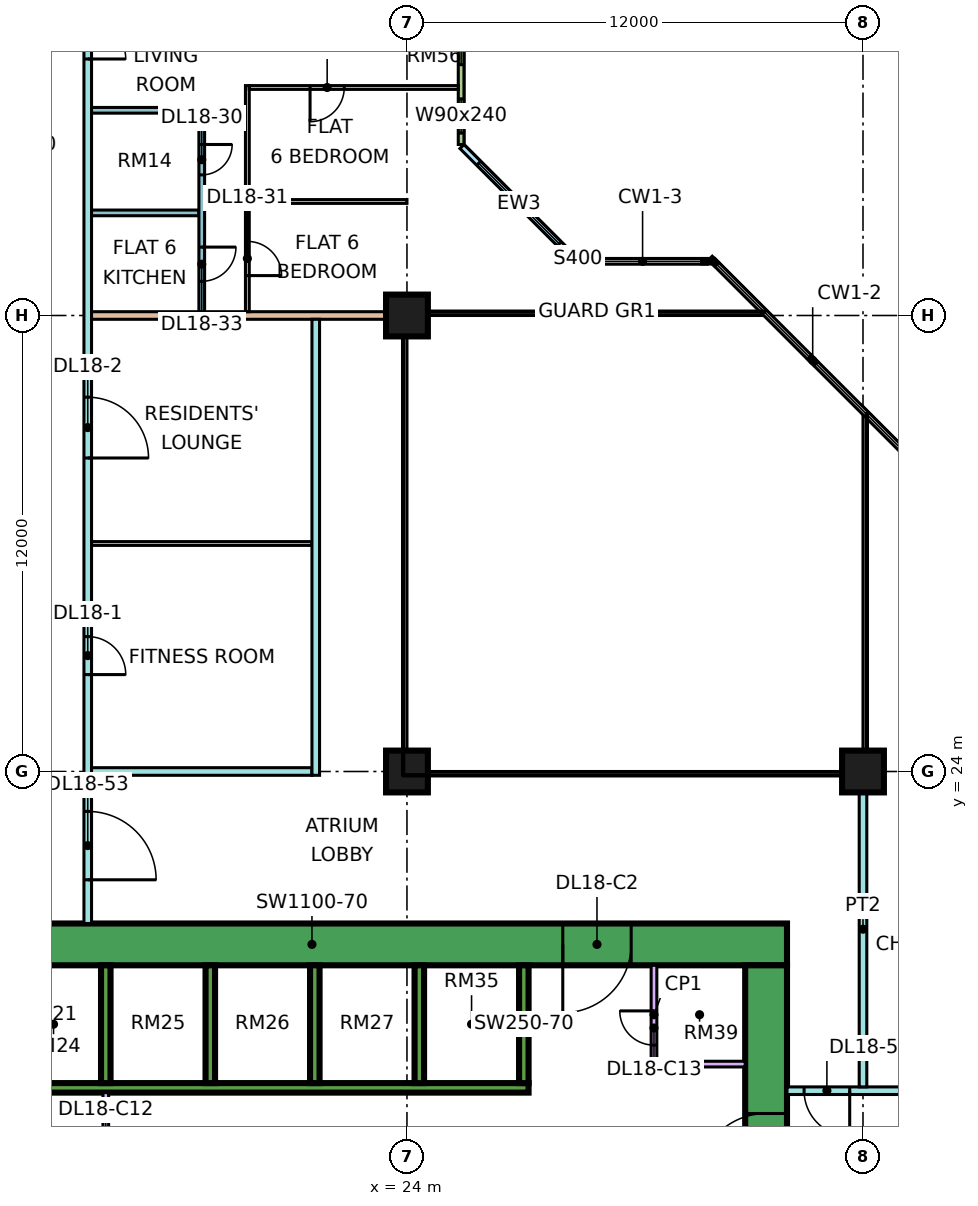
"""IFC4 building model, lengths in metres.
Left out: names, types, materials, properties, quantities, classifications, styles, units other than length and angle.
Written with IfcOpenShell. Run it as: python <this file> out.ifc"""

import sys

from ifc_helpers import new_model, si_unit, direction, frame, frame_2d, origin, origin_2d, place, context, subcontext, project, spatial, rectangle, extrude, element, fill, save


model = new_model("IFC4")
c1 = context("Model", 3, precision=1e-05, world=origin(), true_north=direction((0.0, 1.0)))
c2 = subcontext(c1, "Body", "Model", "MODEL_VIEW")
j1 = project(units=[si_unit("LENGTHUNIT", "METRE"), si_unit("PLANEANGLEUNIT", "RADIAN")], contexts=[c1])
p1 = place(None, origin())
s1 = spatial("IfcSite", under=j1, at=p1, CompositionType="ELEMENT")
p2 = place(p1, origin())
s2 = spatial("IfcBuilding", under=s1, at=p2, CompositionType="ELEMENT")
p3 = place(p2, frame((0.0, 0.0, 82.65)))
s3 = spatial("IfcBuildingStorey", under=s2, at=p3, CompositionType="ELEMENT", Elevation=82.65)
for number, where, z_axis, x_axis in (
    (1, (24.0, 24.0, 0.0), (0.0, 0.0, 1.0), (1.0, 0.0, 0.0)),
    (2, (24.0, 36.0, 0.0), (0.0, 0.0, 1.0), (1.0, 0.0, 0.0)),
    (3, (36.0, 24.0, 0.0), (0.0, 0.0, 1.0), (1.0, 0.0, 0.0)),
):
    element("IfcColumn", number, at=place(p3, frame(where, z_axis=z_axis, x_axis=x_axis)), inside=s3, PredefinedType="COLUMN", context=c2, shape_type="SweptSolid", body=[
        extrude(rectangle(XDim=1.1, YDim=1.1, at=origin_2d()), origin(), (0.0, 0.0, 1.0), 3.75),
    ])
p4 = place(p3, frame((9.0, 19.45, 0.0), z_axis=(0.0, 0.0, 1.0), x_axis=(1.0, 0.0, 0.0)))
e4 = element("IfcWall", 4, at=p4, inside=s3, PredefinedType="SHEAR", context=c2, shape_type="SweptSolid", body=[
    extrude(rectangle(XDim=25.0, YDim=1.1, at=frame_2d((12.5, 0.0))), origin(), (0.0, 0.0, 1.0), 3.75),
])
p5 = place(p4, frame((19.1, 0.0, 0.0)))
e5 = element("IfcOpeningElement", 5, at=p5, cuts=e4, PredefinedType="OPENING", context=c2, shape_type="SweptSolid", body=[
    extrude(rectangle(XDim=1.8, YDim=2.4, at=frame_2d((0.9, 1.2))), frame((0.0, 0.56, 0.0), z_axis=(0.0, -1.0, 0.0), x_axis=(1.0, 0.0, 0.0)), (0.0, 0.0, 1.0), 1.12),
])
p6 = place(p3, frame((33.45, 8.1, 0.0), z_axis=(0.0, 0.0, 1.0), x_axis=(0.0, 1.0, 0.0)))
e6 = element("IfcWall", 6, at=p6, inside=s3, PredefinedType="SHEAR", context=c2, shape_type="SweptSolid", body=[
    extrude(rectangle(XDim=10.8, YDim=1.1, at=frame_2d((5.4, 0.0))), origin(), (0.0, 0.0, 1.0), 3.75),
])
p7 = place(p6, frame((5.1, 0.0, 0.0)))
e7 = element("IfcOpeningElement", 7, at=p7, cuts=e6, PredefinedType="OPENING", context=c2, shape_type="SweptSolid", body=[
    extrude(rectangle(XDim=1.8, YDim=2.4, at=frame_2d((0.9, 1.2))), frame((0.0, 0.56, 0.0), z_axis=(0.0, -1.0, 0.0), x_axis=(1.0, 0.0, 0.0)), (0.0, 0.0, 1.0), 1.12),
])
p8 = place(p3, frame((13.45, 15.675, 0.0), z_axis=(0.0, 0.0, 1.0), x_axis=(1.0, 0.0, 0.0)))
e8 = element("IfcWall", 8, at=p8, inside=s3, PredefinedType="SHEAR", context=c2, shape_type="SweptSolid", body=[
    extrude(rectangle(XDim=13.75, YDim=0.25, at=frame_2d((6.875, 0.0))), origin(), (0.0, 0.0, 1.0), 3.75),
])
for number, where, z_axis, x_axis in (
    (9, (16.075, 15.8, 0.0), (0.0, 0.0, 1.0), (0.0, 1.0, 0.0)),
    (10, (18.825, 15.8, 0.0), (0.0, 0.0, 1.0), (0.0, 1.0, 0.0)),
    (11, (21.575, 15.8, 0.0), (0.0, 0.0, 1.0), (0.0, 1.0, 0.0)),
    (12, (24.325, 15.8, 0.0), (0.0, 0.0, 1.0), (0.0, 1.0, 0.0)),
    (13, (27.075, 15.8, 0.0), (0.0, 0.0, 1.0), (0.0, 1.0, 0.0)),
):
    element("IfcWall", number, at=place(p3, frame(where, z_axis=z_axis, x_axis=x_axis)), inside=s3, PredefinedType="SHEAR", context=c2, shape_type="SweptSolid", body=[
        extrude(rectangle(XDim=3.1, YDim=0.25, at=frame_2d((1.55, 0.0))), origin(), (0.0, 0.0, 1.0), 3.75),
    ])
p9 = place(p3, frame((28.447, 37.447, 0.0), z_axis=(0.0, 0.0, 1.0), x_axis=(-0.707106781187, 0.707106781187, 0.0)))
e14 = element("IfcWall", 14, at=p9, inside=s3, PredefinedType="SOLIDWALL", context=c2, shape_type="SweptSolid", body=[
    extrude(rectangle(XDim=4.243, YDim=0.15, at=frame_2d((2.121, 0.0))), origin(), (0.0, 0.0, 1.0), 3.3),
])
p10 = place(p9, frame((0.621, 0.0, 0.45)))
e15 = element("IfcOpeningElement", 15, at=p10, cuts=e14, PredefinedType="OPENING", context=c2, shape_type="SweptSolid", body=[
    extrude(rectangle(XDim=3.0, YDim=2.4, at=frame_2d((1.5, 1.2))), frame((0.0, 0.085, 0.0), z_axis=(0.0, -1.0, 0.0), x_axis=(1.0, 0.0, 0.0)), (0.0, 0.0, 1.0), 0.17),
])
p11 = place(p3, frame((25.425, 40.5, 0.0), z_axis=(0.0, 0.0, 1.0), x_axis=(0.0, 1.0, 0.0)))
e16 = element("IfcWall", 16, at=p11, inside=s3, PredefinedType="SOLIDWALL", context=c2, shape_type="SweptSolid", body=[
    extrude(rectangle(XDim=7.425, YDim=0.15, at=frame_2d((3.712, 0.0))), origin(), (0.0, 0.0, 1.0), 3.3),
])
p12 = place(p11, frame((0.3, 0.0, 0.45)))
e17 = element("IfcOpeningElement", 17, at=p12, cuts=e16, PredefinedType="OPENING", context=c2, shape_type="SweptSolid", body=[
    extrude(rectangle(XDim=0.9, YDim=2.4, at=frame_2d((0.45, 1.2))), frame((0.0, 0.085, 0.0), z_axis=(0.0, -1.0, 0.0), x_axis=(1.0, 0.0, 0.0)), (0.0, 0.0, 1.0), 0.17),
])
p13 = place(p11, frame((2.1, 0.0, 0.45)))
e18 = element("IfcOpeningElement", 18, at=p13, cuts=e16, PredefinedType="OPENING", context=c2, shape_type="SweptSolid", body=[
    extrude(rectangle(XDim=1.8, YDim=2.4, at=frame_2d((0.9, 1.2))), frame((0.0, 0.085, 0.0), z_axis=(0.0, -1.0, 0.0), x_axis=(1.0, 0.0, 0.0)), (0.0, 0.0, 1.0), 0.17),
])
p14 = place(p11, frame((5.062, 0.0, 0.45)))
e19 = element("IfcOpeningElement", 19, at=p14, cuts=e16, PredefinedType="OPENING", context=c2, shape_type="SweptSolid", body=[
    extrude(rectangle(XDim=1.8, YDim=2.4, at=frame_2d((0.9, 1.2))), frame((0.0, 0.085, 0.0), z_axis=(0.0, -1.0, 0.0), x_axis=(1.0, 0.0, 0.0)), (0.0, 0.0, 1.0), 0.17),
])
p15 = place(p3, frame((16.075, 11.45, 0.0), z_axis=(0.0, 0.0, 1.0), x_axis=(0.0, 1.0, 0.0)))
e20 = element("IfcWall", 20, at=p15, inside=s3, PredefinedType="PARTITIONING", context=c2, shape_type="SweptSolid", body=[
    extrude(rectangle(XDim=4.1, YDim=0.15, at=frame_2d((2.05, 0.0))), origin(), (0.0, 0.0, 1.0), 3.3),
])
p16 = place(p15, frame((1.15, 0.0, 0.0)))
e21 = element("IfcOpeningElement", 21, at=p16, cuts=e20, PredefinedType="OPENING", context=c2, shape_type="SweptSolid", body=[
    extrude(rectangle(XDim=1.8, YDim=2.4, at=frame_2d((0.9, 1.2))), frame((0.0, 0.085, 0.0), z_axis=(0.0, -1.0, 0.0), x_axis=(1.0, 0.0, 0.0)), (0.0, 0.0, 1.0), 0.17),
])
p17 = place(p3, frame((30.5, 16.3, 0.0), z_axis=(0.0, 0.0, 1.0), x_axis=(0.0, 1.0, 0.0)))
e22 = element("IfcWall", 22, at=p17, inside=s3, PredefinedType="PARTITIONING", context=c2, shape_type="SweptSolid", body=[
    extrude(rectangle(XDim=2.6, YDim=0.15, at=frame_2d((1.3, 0.0))), origin(), (0.0, 0.0, 1.0), 3.3),
])
p18 = place(p17, frame((0.5, 0.0, 0.0)))
e23 = element("IfcOpeningElement", 23, at=p18, cuts=e22, PredefinedType="OPENING", context=c2, shape_type="SweptSolid", body=[
    extrude(rectangle(XDim=0.9, YDim=2.1, at=frame_2d((0.45, 1.05))), frame((0.0, 0.085, 0.0), z_axis=(0.0, -1.0, 0.0), x_axis=(1.0, 0.0, 0.0)), (0.0, 0.0, 1.0), 0.17),
])
p19 = place(p3, frame((30.5, 16.3, 0.0), z_axis=(0.0, 0.0, 1.0), x_axis=(1.0, 0.0, 0.0)))
e24 = element("IfcWall", 24, at=p19, inside=s3, PredefinedType="PARTITIONING", context=c2, shape_type="SweptSolid", body=[
    extrude(rectangle(XDim=2.4, YDim=0.15, at=frame_2d((1.2, 0.0))), origin(), (0.0, 0.0, 1.0), 3.3),
])
p20 = place(p3, frame((15.6, 20.0, 0.0), z_axis=(0.0, 0.0, 1.0), x_axis=(0.0, 1.0, 0.0)))
e25 = element("IfcWall", 25, at=p20, inside=s3, PredefinedType="PARTITIONING", context=c2, shape_type="SweptSolid", body=[
    extrude(rectangle(XDim=27.775, YDim=0.2, at=frame_2d((13.887, 0.0))), origin(), (0.0, 0.0, 1.0), 3.3),
])
p21 = place(p20, frame((6.55, 0.0, 0.0)))
e26 = element("IfcOpeningElement", 26, at=p21, cuts=e25, PredefinedType="OPENING", context=c2, shape_type="SweptSolid", body=[
    extrude(rectangle(XDim=1.0, YDim=2.1, at=frame_2d((0.5, 1.05))), frame((0.0, 0.11, 0.0), z_axis=(0.0, -1.0, 0.0), x_axis=(1.0, 0.0, 0.0)), (0.0, 0.0, 1.0), 0.22),
])
p22 = place(p20, frame((12.25, 0.0, 0.0)))
e27 = element("IfcOpeningElement", 27, at=p22, cuts=e25, PredefinedType="OPENING", context=c2, shape_type="SweptSolid", body=[
    extrude(rectangle(XDim=1.6, YDim=2.1, at=frame_2d((0.8, 1.05))), frame((0.0, 0.11, 0.0), z_axis=(0.0, -1.0, 0.0), x_axis=(1.0, 0.0, 0.0)), (0.0, 0.0, 1.0), 0.22),
])
p23 = place(p20, frame((22.75, 0.0, 0.0)))
e28 = element("IfcOpeningElement", 28, at=p23, cuts=e25, PredefinedType="OPENING", context=c2, shape_type="SweptSolid", body=[
    extrude(rectangle(XDim=1.0, YDim=2.1, at=frame_2d((0.5, 1.05))), frame((0.0, 0.11, 0.0), z_axis=(0.0, -1.0, 0.0), x_axis=(1.0, 0.0, 0.0)), (0.0, 0.0, 1.0), 0.22),
])
p24 = place(p20, frame((1.15, 0.0, 0.0)))
e29 = element("IfcOpeningElement", 29, at=p24, cuts=e25, PredefinedType="OPENING", context=c2, shape_type="SweptSolid", body=[
    extrude(rectangle(XDim=1.8, YDim=2.1, at=frame_2d((0.9, 1.05))), frame((0.0, 0.11, 0.0), z_axis=(0.0, -1.0, 0.0), x_axis=(1.0, 0.0, 0.0)), (0.0, 0.0, 1.0), 0.22),
])
p25 = place(p20, frame((25.9, 0.0, 0.0)))
e30 = element("IfcOpeningElement", 30, at=p25, cuts=e25, PredefinedType="OPENING", context=c2, shape_type="SweptSolid", body=[
    extrude(rectangle(XDim=1.0, YDim=2.1, at=frame_2d((0.5, 1.05))), frame((0.0, 0.11, 0.0), z_axis=(0.0, -1.0, 0.0), x_axis=(1.0, 0.0, 0.0)), (0.0, 0.0, 1.0), 0.22),
])
p26 = place(p3, frame((15.7, 24.0, 0.0), z_axis=(0.0, 0.0, 1.0), x_axis=(1.0, 0.0, 0.0)))
e31 = element("IfcWall", 31, at=p26, inside=s3, PredefinedType="PARTITIONING", context=c2, shape_type="SweptSolid", body=[
    extrude(rectangle(XDim=5.8, YDim=0.2, at=frame_2d((2.9, 0.0))), origin(), (0.0, 0.0, 1.0), 3.3),
])
p27 = place(p3, frame((15.7, 30.0, 0.0), z_axis=(0.0, 0.0, 1.0), x_axis=(1.0, 0.0, 0.0)))
e32 = element("IfcWall", 32, at=p27, inside=s3, PredefinedType="PARTITIONING", context=c2, shape_type="SweptSolid", body=[
    extrude(rectangle(XDim=5.8, YDim=0.1, at=frame_2d((2.9, 0.0))), origin(), (0.0, 0.0, 1.0), 3.3),
])
p28 = place(p3, frame((15.7, 36.0, 0.0), z_axis=(0.0, 0.0, 1.0), x_axis=(1.0, 0.0, 0.0)))
e33 = element("IfcWall", 33, at=p28, inside=s3, PredefinedType="PARTITIONING", context=c2, shape_type="SweptSolid", body=[
    extrude(rectangle(XDim=8.3, YDim=0.2, at=frame_2d((4.15, 0.0))), origin(), (0.0, 0.0, 1.0), 3.3),
])
for number, where, z_axis, x_axis in (
    (34, (15.7, 38.7, 0.0), (0.0, 0.0, 1.0), (1.0, 0.0, 0.0)),
    (35, (15.7, 41.4, 0.0), (0.0, 0.0, 1.0), (1.0, 0.0, 0.0)),
):
    element("IfcWall", number, at=place(p3, frame(where, z_axis=z_axis, x_axis=x_axis)), inside=s3, PredefinedType="PARTITIONING", context=c2, shape_type="SweptSolid", body=[
        extrude(rectangle(XDim=2.825, YDim=0.15, at=frame_2d((1.413, 0.0))), origin(), (0.0, 0.0, 1.0), 3.3),
    ])
p29 = place(p3, frame((18.6, 36.1, 0.0), z_axis=(0.0, 0.0, 1.0), x_axis=(0.0, 1.0, 0.0)))
e36 = element("IfcWall", 36, at=p29, inside=s3, PredefinedType="PARTITIONING", context=c2, shape_type="SweptSolid", body=[
    extrude(rectangle(XDim=5.375, YDim=0.15, at=frame_2d((2.688, 0.0))), origin(), (0.0, 0.0, 1.0), 3.3),
])
p30 = place(p29, frame((3.6, 0.0, 0.0)))
e37 = element("IfcOpeningElement", 37, at=p30, cuts=e36, PredefinedType="OPENING", context=c2, shape_type="SweptSolid", body=[
    extrude(rectangle(XDim=0.8, YDim=2.1, at=frame_2d((0.4, 1.05))), frame((0.0, 0.085, 0.0), z_axis=(0.0, -1.0, 0.0), x_axis=(1.0, 0.0, 0.0)), (0.0, 0.0, 1.0), 0.17),
])
p31 = place(p29, frame((0.8, 0.0, 0.0)))
e38 = element("IfcOpeningElement", 38, at=p31, cuts=e36, PredefinedType="OPENING", context=c2, shape_type="SweptSolid", body=[
    extrude(rectangle(XDim=0.9, YDim=2.1, at=frame_2d((0.45, 1.05))), frame((0.0, 0.085, 0.0), z_axis=(0.0, -1.0, 0.0), x_axis=(1.0, 0.0, 0.0)), (0.0, 0.0, 1.0), 0.17),
])
p32 = place(p3, frame((19.8, 36.1, 0.0), z_axis=(0.0, 0.0, 1.0), x_axis=(0.0, 1.0, 0.0)))
e39 = element("IfcWall", 39, at=p32, inside=s3, PredefinedType="PARTITIONING", context=c2, shape_type="SweptSolid", body=[
    extrude(rectangle(XDim=5.95, YDim=0.1, at=frame_2d((2.975, 0.0))), origin(), (0.0, 0.0, 1.0), 3.3),
])
p33 = place(p32, frame((0.95, 0.0, 0.0)))
e40 = element("IfcOpeningElement", 40, at=p33, cuts=e39, PredefinedType="OPENING", context=c2, shape_type="SweptSolid", body=[
    extrude(rectangle(XDim=0.9, YDim=2.1, at=frame_2d((0.45, 1.05))), frame((0.0, 0.06, 0.0), z_axis=(0.0, -1.0, 0.0), x_axis=(1.0, 0.0, 0.0)), (0.0, 0.0, 1.0), 0.12),
])
p34 = place(p3, frame((19.85, 39.0, 0.0), z_axis=(0.0, 0.0, 1.0), x_axis=(1.0, 0.0, 0.0)))
e41 = element("IfcWall", 41, at=p34, inside=s3, PredefinedType="PARTITIONING", context=c2, shape_type="SweptSolid", body=[
    extrude(rectangle(XDim=4.15, YDim=0.1, at=frame_2d((2.075, 0.0))), origin(), (0.0, 0.0, 1.0), 3.3),
])
p35 = place(p3, frame((19.85, 42.0, 0.0), z_axis=(0.0, 0.0, 1.0), x_axis=(1.0, 0.0, 0.0)))
e42 = element("IfcWall", 42, at=p35, inside=s3, PredefinedType="PARTITIONING", context=c2, shape_type="SweptSolid", body=[
    extrude(rectangle(XDim=5.5, YDim=0.1, at=frame_2d((2.75, 0.0))), origin(), (0.0, 0.0, 1.0), 3.3),
])
p36 = place(p35, frame((1.6, 0.0, 0.0)))
e43 = element("IfcOpeningElement", 43, at=p36, cuts=e42, PredefinedType="OPENING", context=c2, shape_type="SweptSolid", body=[
    extrude(rectangle(XDim=0.9, YDim=2.1, at=frame_2d((0.45, 1.05))), frame((0.0, 0.06, 0.0), z_axis=(0.0, -1.0, 0.0), x_axis=(1.0, 0.0, 0.0)), (0.0, 0.0, 1.0), 0.12),
])
p37 = place(p3, frame((21.6, 23.9, 0.0), z_axis=(0.0, 0.0, 1.0), x_axis=(0.0, 1.0, 0.0)))
e44 = element("IfcWall", 44, at=p37, inside=s3, PredefinedType="PARTITIONING", context=c2, shape_type="SweptSolid", body=[
    extrude(rectangle(XDim=12.0, YDim=0.2, at=frame_2d((6.0, 0.0))), origin(), (0.0, 0.0, 1.0), 3.3),
])
p38 = place(p3, frame((34.0, 15.6, 0.0), z_axis=(0.0, 0.0, 1.0), x_axis=(1.0, 0.0, 0.0)))
e45 = element("IfcWall", 45, at=p38, inside=s3, PredefinedType="PARTITIONING", context=c2, shape_type="SweptSolid", body=[
    extrude(rectangle(XDim=10.35, YDim=0.2, at=frame_2d((5.175, 0.0))), origin(), (0.0, 0.0, 1.0), 3.3),
])
p39 = place(p38, frame((5.6, 0.0, 0.0)))
e46 = element("IfcOpeningElement", 46, at=p39, cuts=e45, PredefinedType="OPENING", context=c2, shape_type="SweptSolid", body=[
    extrude(rectangle(XDim=1.0, YDim=2.1, at=frame_2d((0.5, 1.05))), frame((0.0, 0.11, 0.0), z_axis=(0.0, -1.0, 0.0), x_axis=(1.0, 0.0, 0.0)), (0.0, 0.0, 1.0), 0.22),
])
p40 = place(p38, frame((0.45, 0.0, 0.0)))
e47 = element("IfcOpeningElement", 47, at=p40, cuts=e45, PredefinedType="OPENING", context=c2, shape_type="SweptSolid", body=[
    extrude(rectangle(XDim=1.2, YDim=2.1, at=frame_2d((0.6, 1.05))), frame((0.0, 0.11, 0.0), z_axis=(0.0, -1.0, 0.0), x_axis=(1.0, 0.0, 0.0)), (0.0, 0.0, 1.0), 0.22),
])
p41 = place(p3, frame((36.0, 15.7, 0.0), z_axis=(0.0, 0.0, 1.0), x_axis=(0.0, 1.0, 0.0)))
e48 = element("IfcWall", 48, at=p41, inside=s3, PredefinedType="PARTITIONING", context=c2, shape_type="SweptSolid", body=[
    extrude(rectangle(XDim=8.3, YDim=0.2, at=frame_2d((4.15, 0.0))), origin(), (0.0, 0.0, 1.0), 3.3),
])
p42 = place(p10, origin())
e49 = element("IfcWindow", 49, at=p42, inside=s3, PartitioningType="SINGLE_PANEL", PredefinedType="WINDOW", context=c2, shape_type="SweptSolid", body=[
    extrude(rectangle(XDim=3.0, YDim=2.4, at=frame_2d((1.5, 1.2))), frame((0.0, 0.03, 0.0), z_axis=(0.0, -1.0, 0.0), x_axis=(1.0, 0.0, 0.0)), (0.0, 0.0, 1.0), 0.06),
])
fill(e15, e49)
p43 = place(p12, origin())
e50 = element("IfcWindow", 50, at=p43, inside=s3, PartitioningType="SINGLE_PANEL", PredefinedType="WINDOW", context=c2, shape_type="SweptSolid", body=[
    extrude(rectangle(XDim=0.9, YDim=2.4, at=frame_2d((0.45, 1.2))), frame((0.0, 0.03, 0.0), z_axis=(0.0, -1.0, 0.0), x_axis=(1.0, 0.0, 0.0)), (0.0, 0.0, 1.0), 0.06),
])
fill(e17, e50)
p44 = place(p13, origin())
e51 = element("IfcWindow", 51, at=p44, inside=s3, PartitioningType="SINGLE_PANEL", PredefinedType="WINDOW", context=c2, shape_type="SweptSolid", body=[
    extrude(rectangle(XDim=1.8, YDim=2.4, at=frame_2d((0.9, 1.2))), frame((0.0, 0.03, 0.0), z_axis=(0.0, -1.0, 0.0), x_axis=(1.0, 0.0, 0.0)), (0.0, 0.0, 1.0), 0.06),
])
fill(e18, e51)
p45 = place(p7, origin())
e52 = element("IfcDoor", 52, at=p45, inside=s3, OperationType="DOUBLE_DOOR_SINGLE_SWING", PredefinedType="DOOR", context=c2, shape_type="SweptSolid", body=[
    extrude(rectangle(XDim=1.8, YDim=2.4, at=frame_2d((0.9, 1.2))), frame((0.0, 0.025, 0.0), z_axis=(0.0, -1.0, 0.0), x_axis=(1.0, 0.0, 0.0)), (0.0, 0.0, 1.0), 0.05),
])
fill(e7, e52)
p46 = place(p5, frame((1.8, 0.0, 0.0), z_axis=(0.0, 0.0, 1.0), x_axis=(-1.0, 0.0, 0.0)))
e53 = element("IfcDoor", 53, at=p46, inside=s3, OperationType="DOUBLE_DOOR_SINGLE_SWING", PredefinedType="DOOR", context=c2, shape_type="SweptSolid", body=[
    extrude(rectangle(XDim=1.8, YDim=2.4, at=frame_2d((0.9, 1.2))), frame((0.0, 0.025, 0.0), z_axis=(0.0, -1.0, 0.0), x_axis=(1.0, 0.0, 0.0)), (0.0, 0.0, 1.0), 0.05),
])
fill(e5, e53)
p47 = place(p18, frame((0.9, 0.0, 0.0), z_axis=(0.0, 0.0, 1.0), x_axis=(-1.0, 0.0, 0.0)))
e54 = element("IfcDoor", 54, at=p47, inside=s3, OperationType="SINGLE_SWING_RIGHT", PredefinedType="DOOR", context=c2, shape_type="SweptSolid", body=[
    extrude(rectangle(XDim=0.9, YDim=2.1, at=frame_2d((0.45, 1.05))), frame((0.0, 0.025, 0.0), z_axis=(0.0, -1.0, 0.0), x_axis=(1.0, 0.0, 0.0)), (0.0, 0.0, 1.0), 0.05),
])
fill(e23, e54)
p48 = place(p21, frame((1.0, 0.0, 0.0), z_axis=(0.0, 0.0, 1.0), x_axis=(-1.0, 0.0, 0.0)))
e55 = element("IfcDoor", 55, at=p48, inside=s3, OperationType="SINGLE_SWING_LEFT", PredefinedType="DOOR", context=c2, shape_type="SweptSolid", body=[
    extrude(rectangle(XDim=1.0, YDim=2.1, at=frame_2d((0.5, 1.05))), frame((0.0, 0.025, 0.0), z_axis=(0.0, -1.0, 0.0), x_axis=(1.0, 0.0, 0.0)), (0.0, 0.0, 1.0), 0.05),
])
fill(e26, e55)
p49 = place(p22, frame((1.6, 0.0, 0.0), z_axis=(0.0, 0.0, 1.0), x_axis=(-1.0, 0.0, 0.0)))
e56 = element("IfcDoor", 56, at=p49, inside=s3, OperationType="DOUBLE_DOOR_SINGLE_SWING", PredefinedType="DOOR", context=c2, shape_type="SweptSolid", body=[
    extrude(rectangle(XDim=1.6, YDim=2.1, at=frame_2d((0.8, 1.05))), frame((0.0, 0.025, 0.0), z_axis=(0.0, -1.0, 0.0), x_axis=(1.0, 0.0, 0.0)), (0.0, 0.0, 1.0), 0.05),
])
fill(e27, e56)
p50 = place(p30, origin())
e57 = element("IfcDoor", 57, at=p50, inside=s3, OperationType="SINGLE_SWING_RIGHT", PredefinedType="DOOR", context=c2, shape_type="SweptSolid", body=[
    extrude(rectangle(XDim=0.8, YDim=2.1, at=frame_2d((0.4, 1.05))), frame((0.0, 0.025, 0.0), z_axis=(0.0, -1.0, 0.0), x_axis=(1.0, 0.0, 0.0)), (0.0, 0.0, 1.0), 0.05),
])
fill(e37, e57)
p51 = place(p33, frame((0.9, 0.0, 0.0), z_axis=(0.0, 0.0, 1.0), x_axis=(-1.0, 0.0, 0.0)))
e58 = element("IfcDoor", 58, at=p51, inside=s3, OperationType="SINGLE_SWING_LEFT", PredefinedType="DOOR", context=c2, shape_type="SweptSolid", body=[
    extrude(rectangle(XDim=0.9, YDim=2.1, at=frame_2d((0.45, 1.05))), frame((0.0, 0.025, 0.0), z_axis=(0.0, -1.0, 0.0), x_axis=(1.0, 0.0, 0.0)), (0.0, 0.0, 1.0), 0.05),
])
fill(e40, e58)
p52 = place(p36, frame((0.9, 0.0, 0.0), z_axis=(0.0, 0.0, 1.0), x_axis=(-1.0, 0.0, 0.0)))
e59 = element("IfcDoor", 59, at=p52, inside=s3, OperationType="SINGLE_SWING_LEFT", PredefinedType="DOOR", context=c2, shape_type="SweptSolid", body=[
    extrude(rectangle(XDim=0.9, YDim=2.1, at=frame_2d((0.45, 1.05))), frame((0.0, 0.025, 0.0), z_axis=(0.0, -1.0, 0.0), x_axis=(1.0, 0.0, 0.0)), (0.0, 0.0, 1.0), 0.05),
])
fill(e43, e59)
p53 = place(p31, origin())
e60 = element("IfcDoor", 60, at=p53, inside=s3, OperationType="SINGLE_SWING_RIGHT", PredefinedType="DOOR", context=c2, shape_type="SweptSolid", body=[
    extrude(rectangle(XDim=0.9, YDim=2.1, at=frame_2d((0.45, 1.05))), frame((0.0, 0.025, 0.0), z_axis=(0.0, -1.0, 0.0), x_axis=(1.0, 0.0, 0.0)), (0.0, 0.0, 1.0), 0.05),
])
fill(e38, e60)
p54 = place(p23, frame((1.0, 0.0, 0.0), z_axis=(0.0, 0.0, 1.0), x_axis=(-1.0, 0.0, 0.0)))
e61 = element("IfcDoor", 61, at=p54, inside=s3, OperationType="SINGLE_SWING_LEFT", PredefinedType="DOOR", context=c2, shape_type="SweptSolid", body=[
    extrude(rectangle(XDim=1.0, YDim=2.1, at=frame_2d((0.5, 1.05))), frame((0.0, 0.025, 0.0), z_axis=(0.0, -1.0, 0.0), x_axis=(1.0, 0.0, 0.0)), (0.0, 0.0, 1.0), 0.05),
])
fill(e28, e61)
p55 = place(p40, origin())
e62 = element("IfcDoor", 62, at=p55, inside=s3, OperationType="SINGLE_SWING_RIGHT", PredefinedType="DOOR", context=c2, shape_type="SweptSolid", body=[
    extrude(rectangle(XDim=1.2, YDim=2.1, at=frame_2d((0.6, 1.05))), frame((0.0, 0.025, 0.0), z_axis=(0.0, -1.0, 0.0), x_axis=(1.0, 0.0, 0.0)), (0.0, 0.0, 1.0), 0.05),
])
fill(e47, e62)
p56 = place(p24, frame((1.8, 0.0, 0.0), z_axis=(0.0, 0.0, 1.0), x_axis=(-1.0, 0.0, 0.0)))
e63 = element("IfcDoor", 63, at=p56, inside=s3, OperationType="DOUBLE_DOOR_SINGLE_SWING", PredefinedType="DOOR", context=c2, shape_type="SweptSolid", body=[
    extrude(rectangle(XDim=1.8, YDim=2.1, at=frame_2d((0.9, 1.05))), frame((0.0, 0.025, 0.0), z_axis=(0.0, -1.0, 0.0), x_axis=(1.0, 0.0, 0.0)), (0.0, 0.0, 1.0), 0.05),
])
fill(e29, e63)
save(model, sys.argv[1])
